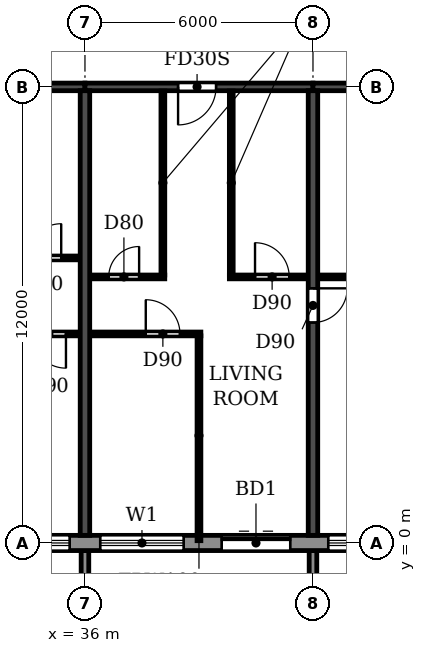
"""IFC4 building model, lengths in metres.
Left out: names, types, materials, properties, quantities, classifications, styles, units other than length and angle.
Written with IfcOpenShell. Run it as: python <this file> out.ifc"""

import sys

from ifc_helpers import new_model, si_unit, direction, frame, frame_2d, origin, place, context, subcontext, project, spatial, polyline, rectangle, outline, extrude, source, transform, mapped, element, fill, save


model = new_model("IFC4")
c1 = context("Model", 3, precision=1e-05, world=origin(), true_north=direction((0.0, 1.0)))
c2 = subcontext(c1, "Body", "Model", "MODEL_VIEW")
j1 = project(units=[si_unit("LENGTHUNIT", "METRE"), si_unit("PLANEANGLEUNIT", "RADIAN")], contexts=[c1])
p1 = place(None, origin())
s1 = spatial("IfcSite", under=j1, at=p1, CompositionType="ELEMENT")
p2 = place(p1, origin())
s2 = spatial("IfcBuilding", under=s1, at=p2, CompositionType="ELEMENT")
p3 = place(p2, frame((0.0, 0.0, 221.4)))
s3 = spatial("IfcBuildingStorey", under=s2, at=p3, CompositionType="ELEMENT", Elevation=221.4)
p4 = place(p3, frame((36.0, 0.2, 0.0), z_axis=(0.0, 0.0, 1.0), x_axis=(0.0, 1.0, 0.0)))
e1 = element("IfcWall", 1, at=p4, inside=s3, PredefinedType="SHEAR", context=c2, shape_type="SweptSolid", body=[
    extrude(rectangle(XDim=11.7, YDim=0.25, at=frame_2d((5.85, 0.0))), origin(), (0.0, 0.0, 1.0), 3.08),
])
p5 = place(p3, frame((42.0, 0.2, 0.0), z_axis=(0.0, 0.0, 1.0), x_axis=(0.0, 1.0, 0.0)))
e2 = element("IfcWall", 2, at=p5, inside=s3, PredefinedType="SHEAR", context=c2, shape_type="SweptSolid", body=[
    extrude(rectangle(XDim=11.7, YDim=0.25, at=frame_2d((5.85, 0.0))), origin(), (0.0, 0.0, 1.0), 3.08),
])
p6 = place(p5, frame((5.6, 0.0, 0.0)))
e3 = element("IfcOpeningElement", 3, at=p6, cuts=e2, PredefinedType="OPENING", context=c2, shape_type="SweptSolid", body=[
    extrude(rectangle(XDim=0.9, YDim=2.1, at=frame_2d((0.45, 1.05))), frame((0.0, 0.135, 0.0), z_axis=(0.0, -1.0, 0.0), x_axis=(1.0, 0.0, 0.0)), (0.0, 0.0, 1.0), 0.27),
])
p7 = place(p3, frame((30.0, 12.0, 0.0), z_axis=(0.0, 0.0, 1.0), x_axis=(1.0, 0.0, 0.0)))
e4 = element("IfcWall", 4, at=p7, inside=s3, PredefinedType="SHEAR", context=c2, shape_type="SweptSolid", body=[
    extrude(rectangle(XDim=6.0, YDim=0.2, at=frame_2d((3.0, 0.0))), origin(), (0.0, 0.0, 1.0), 2.48),
])
p8 = place(p7, frame((2.45, 0.0, 0.0)))
e5 = element("IfcOpeningElement", 5, at=p8, cuts=e4, PredefinedType="OPENING", context=c2, shape_type="SweptSolid", body=[
    extrude(rectangle(XDim=1.0, YDim=2.1, at=frame_2d((0.5, 1.05))), frame((0.0, 0.11, 0.0), z_axis=(0.0, -1.0, 0.0), x_axis=(1.0, 0.0, 0.0)), (0.0, 0.0, 1.0), 0.22),
])
p9 = place(p3, frame((36.0, 12.0, 0.0), z_axis=(0.0, 0.0, 1.0), x_axis=(1.0, 0.0, 0.0)))
e6 = element("IfcWall", 6, at=p9, inside=s3, PredefinedType="SHEAR", context=c2, shape_type="SweptSolid", body=[
    extrude(rectangle(XDim=6.0, YDim=0.2, at=frame_2d((3.0, 0.0))), origin(), (0.0, 0.0, 1.0), 2.48),
])
p10 = place(p9, frame((2.45, 0.0, 0.0)))
e7 = element("IfcOpeningElement", 7, at=p10, cuts=e6, PredefinedType="OPENING", context=c2, shape_type="SweptSolid", body=[
    extrude(rectangle(XDim=1.0, YDim=2.1, at=frame_2d((0.5, 1.05))), frame((0.0, 0.11, 0.0), z_axis=(0.0, -1.0, 0.0), x_axis=(1.0, 0.0, 0.0)), (0.0, 0.0, 1.0), 0.22),
])
p11 = place(p3, frame((42.0, 12.0, 0.0), z_axis=(0.0, 0.0, 1.0), x_axis=(1.0, 0.0, 0.0)))
e8 = element("IfcWall", 8, at=p11, inside=s3, PredefinedType="SHEAR", context=c2, shape_type="SweptSolid", body=[
    extrude(rectangle(XDim=6.0, YDim=0.2, at=frame_2d((3.0, 0.0))), origin(), (0.0, 0.0, 1.0), 2.48),
])
p12 = place(p3, frame((22.683, 0.0, 0.0), z_axis=(0.0, 0.0, 1.0), x_axis=(1.0, 0.0, 0.0)))
e9 = element("IfcWall", 9, at=p12, inside=s3, PredefinedType="STANDARD", context=c2, shape_type="SweptSolid", body=[
    extrude(rectangle(XDim=56.634, YDim=0.4, at=frame_2d((28.317, 0.0))), origin(), (0.0, 0.0, 1.0), 3.08),
])
p13 = place(p12, frame((1.717, 0.0, 0.9)))
e10 = element("IfcOpeningElement", 10, at=p13, cuts=e9, PredefinedType="OPENING", context=c2, shape_type="SweptSolid", body=[
    extrude(rectangle(XDim=2.2, YDim=1.5, at=frame_2d((1.1, 0.75))), frame((0.0, 0.21, 0.0), z_axis=(0.0, -1.0, 0.0), x_axis=(1.0, 0.0, 0.0)), (0.0, 0.0, 1.0), 0.42),
])
p14 = place(p12, frame((4.917, 0.0, 0.0)))
e11 = element("IfcOpeningElement", 11, at=p14, cuts=e9, PredefinedType="OPENING", context=c2, shape_type="SweptSolid", body=[
    extrude(rectangle(XDim=1.8, YDim=2.4, at=frame_2d((0.9, 1.2))), frame((0.0, 0.21, 0.0), z_axis=(0.0, -1.0, 0.0), x_axis=(1.0, 0.0, 0.0)), (0.0, 0.0, 1.0), 0.42),
])
p15 = place(p12, frame((7.717, 0.0, 0.9)))
e12 = element("IfcOpeningElement", 12, at=p15, cuts=e9, PredefinedType="OPENING", context=c2, shape_type="SweptSolid", body=[
    extrude(rectangle(XDim=2.2, YDim=1.5, at=frame_2d((1.1, 0.75))), frame((0.0, 0.21, 0.0), z_axis=(0.0, -1.0, 0.0), x_axis=(1.0, 0.0, 0.0)), (0.0, 0.0, 1.0), 0.42),
])
p16 = place(p12, frame((10.717, 0.0, 0.9)))
e13 = element("IfcOpeningElement", 13, at=p16, cuts=e9, PredefinedType="OPENING", context=c2, shape_type="SweptSolid", body=[
    extrude(rectangle(XDim=2.2, YDim=1.5, at=frame_2d((1.1, 0.75))), frame((0.0, 0.21, 0.0), z_axis=(0.0, -1.0, 0.0), x_axis=(1.0, 0.0, 0.0)), (0.0, 0.0, 1.0), 0.42),
])
p17 = place(p12, frame((13.717, 0.0, 0.9)))
e14 = element("IfcOpeningElement", 14, at=p17, cuts=e9, PredefinedType="OPENING", context=c2, shape_type="SweptSolid", body=[
    extrude(rectangle(XDim=2.2, YDim=1.5, at=frame_2d((1.1, 0.75))), frame((0.0, 0.21, 0.0), z_axis=(0.0, -1.0, 0.0), x_axis=(1.0, 0.0, 0.0)), (0.0, 0.0, 1.0), 0.42),
])
p18 = place(p12, frame((16.917, 0.0, 0.0)))
e15 = element("IfcOpeningElement", 15, at=p18, cuts=e9, PredefinedType="OPENING", context=c2, shape_type="SweptSolid", body=[
    extrude(rectangle(XDim=1.8, YDim=2.4, at=frame_2d((0.9, 1.2))), frame((0.0, 0.21, 0.0), z_axis=(0.0, -1.0, 0.0), x_axis=(1.0, 0.0, 0.0)), (0.0, 0.0, 1.0), 0.42),
])
p19 = place(p12, frame((19.717, 0.0, 0.9)))
e16 = element("IfcOpeningElement", 16, at=p19, cuts=e9, PredefinedType="OPENING", context=c2, shape_type="SweptSolid", body=[
    extrude(rectangle(XDim=2.2, YDim=1.5, at=frame_2d((1.1, 0.75))), frame((0.0, 0.21, 0.0), z_axis=(0.0, -1.0, 0.0), x_axis=(1.0, 0.0, 0.0)), (0.0, 0.0, 1.0), 0.42),
])
p20 = place(p12, frame((22.717, 0.0, 0.9)))
e17 = element("IfcOpeningElement", 17, at=p20, cuts=e9, PredefinedType="OPENING", context=c2, shape_type="SweptSolid", body=[
    extrude(rectangle(XDim=2.2, YDim=1.5, at=frame_2d((1.1, 0.75))), frame((0.0, 0.21, 0.0), z_axis=(0.0, -1.0, 0.0), x_axis=(1.0, 0.0, 0.0)), (0.0, 0.0, 1.0), 0.42),
])
p21 = place(p12, frame((25.917, 0.0, 0.0)))
e18 = element("IfcOpeningElement", 18, at=p21, cuts=e9, PredefinedType="OPENING", context=c2, shape_type="SweptSolid", body=[
    extrude(rectangle(XDim=1.8, YDim=2.4, at=frame_2d((0.9, 1.2))), frame((0.0, 0.21, 0.0), z_axis=(0.0, -1.0, 0.0), x_axis=(1.0, 0.0, 0.0)), (0.0, 0.0, 1.0), 0.42),
])
p22 = place(p12, frame((28.717, 0.0, 0.9)))
e19 = element("IfcOpeningElement", 19, at=p22, cuts=e9, PredefinedType="OPENING", context=c2, shape_type="SweptSolid", body=[
    extrude(rectangle(XDim=2.2, YDim=1.5, at=frame_2d((1.1, 0.75))), frame((0.0, 0.21, 0.0), z_axis=(0.0, -1.0, 0.0), x_axis=(1.0, 0.0, 0.0)), (0.0, 0.0, 1.0), 0.42),
])
p23 = place(p12, frame((31.717, 0.0, 0.9)))
e20 = element("IfcOpeningElement", 20, at=p23, cuts=e9, PredefinedType="OPENING", context=c2, shape_type="SweptSolid", body=[
    extrude(rectangle(XDim=2.2, YDim=1.5, at=frame_2d((1.1, 0.75))), frame((0.0, 0.21, 0.0), z_axis=(0.0, -1.0, 0.0), x_axis=(1.0, 0.0, 0.0)), (0.0, 0.0, 1.0), 0.42),
])
p24 = place(p12, frame((34.717, 0.0, 0.9)))
e21 = element("IfcOpeningElement", 21, at=p24, cuts=e9, PredefinedType="OPENING", context=c2, shape_type="SweptSolid", body=[
    extrude(rectangle(XDim=2.2, YDim=1.5, at=frame_2d((1.1, 0.75))), frame((0.0, 0.21, 0.0), z_axis=(0.0, -1.0, 0.0), x_axis=(1.0, 0.0, 0.0)), (0.0, 0.0, 1.0), 0.42),
])
p25 = place(p12, frame((37.917, 0.0, 0.0)))
e22 = element("IfcOpeningElement", 22, at=p25, cuts=e9, PredefinedType="OPENING", context=c2, shape_type="SweptSolid", body=[
    extrude(rectangle(XDim=1.8, YDim=2.4, at=frame_2d((0.9, 1.2))), frame((0.0, 0.21, 0.0), z_axis=(0.0, -1.0, 0.0), x_axis=(1.0, 0.0, 0.0)), (0.0, 0.0, 1.0), 0.42),
])
p26 = place(p12, frame((40.717, 0.0, 0.9)))
e23 = element("IfcOpeningElement", 23, at=p26, cuts=e9, PredefinedType="OPENING", context=c2, shape_type="SweptSolid", body=[
    extrude(rectangle(XDim=2.2, YDim=1.5, at=frame_2d((1.1, 0.75))), frame((0.0, 0.21, 0.0), z_axis=(0.0, -1.0, 0.0), x_axis=(1.0, 0.0, 0.0)), (0.0, 0.0, 1.0), 0.42),
])
p27 = place(p12, frame((43.717, 0.0, 0.9)))
e24 = element("IfcOpeningElement", 24, at=p27, cuts=e9, PredefinedType="OPENING", context=c2, shape_type="SweptSolid", body=[
    extrude(rectangle(XDim=2.2, YDim=1.5, at=frame_2d((1.1, 0.75))), frame((0.0, 0.21, 0.0), z_axis=(0.0, -1.0, 0.0), x_axis=(1.0, 0.0, 0.0)), (0.0, 0.0, 1.0), 0.42),
])
p28 = place(p12, frame((46.717, 0.0, 0.9)))
e25 = element("IfcOpeningElement", 25, at=p28, cuts=e9, PredefinedType="OPENING", context=c2, shape_type="SweptSolid", body=[
    extrude(rectangle(XDim=2.2, YDim=1.5, at=frame_2d((1.1, 0.75))), frame((0.0, 0.21, 0.0), z_axis=(0.0, -1.0, 0.0), x_axis=(1.0, 0.0, 0.0)), (0.0, 0.0, 1.0), 0.42),
])
p29 = place(p12, frame((49.917, 0.0, 0.0)))
e26 = element("IfcOpeningElement", 26, at=p29, cuts=e9, PredefinedType="OPENING", context=c2, shape_type="SweptSolid", body=[
    extrude(rectangle(XDim=1.8, YDim=2.4, at=frame_2d((0.9, 1.2))), frame((0.0, 0.21, 0.0), z_axis=(0.0, -1.0, 0.0), x_axis=(1.0, 0.0, 0.0)), (0.0, 0.0, 1.0), 0.42),
])
p30 = place(p12, frame((52.717, 0.0, 0.9)))
e27 = element("IfcOpeningElement", 27, at=p30, cuts=e9, PredefinedType="OPENING", context=c2, shape_type="SweptSolid", body=[
    extrude(rectangle(XDim=2.2, YDim=1.5, at=frame_2d((1.1, 0.75))), frame((0.0, 0.21, 0.0), z_axis=(0.0, -1.0, 0.0), x_axis=(1.0, 0.0, 0.0)), (0.0, 0.0, 1.0), 0.42),
])
m1 = source(origin(), c2, "Body", "SweptSolid", [
    extrude(outline(polyline([(0.0, 0.0), (0.2, 0.0), (0.2, 1.65), (0.0, 1.65), (0.0, 0.0)])), origin(), (0.0, 0.0, 1.0), 3.1),
])
for number, where in (
    (28, (35.9, -1.85, 0.0)),
    (29, (41.9, -1.85, 0.0)),
):
    element("IfcWall", number, at=place(p3, frame(where)), inside=s3, PredefinedType="STANDARD", context=c2, shape_type="MappedRepresentation", body=[
        mapped(m1, transform((0.0, 0.0, 0.0))),
    ])
p31 = place(p3, frame((32.95, 5.5, 0.0), z_axis=(0.0, 0.0, 1.0), x_axis=(1.0, 0.0, 0.0)))
e30 = element("IfcWall", 30, at=p31, inside=s3, PredefinedType="PARTITIONING", context=c2, shape_type="SweptSolid", body=[
    extrude(rectangle(XDim=2.915, YDim=0.1, at=frame_2d((1.458, 0.0))), origin(), (0.0, 0.0, 1.0), 3.08),
])
p32 = place(p31, frame((1.65, 0.0, 0.0)))
e31 = element("IfcOpeningElement", 31, at=p32, cuts=e30, PredefinedType="OPENING", context=c2, shape_type="SweptSolid", body=[
    extrude(rectangle(XDim=0.9, YDim=2.1, at=frame_2d((0.45, 1.05))), frame((0.0, 0.06, 0.0), z_axis=(0.0, -1.0, 0.0), x_axis=(1.0, 0.0, 0.0)), (0.0, 0.0, 1.0), 0.12),
])
p33 = place(p3, frame((36.135, 5.5, 0.0), z_axis=(0.0, 0.0, 1.0), x_axis=(1.0, 0.0, 0.0)))
e32 = element("IfcWall", 32, at=p33, inside=s3, PredefinedType="PARTITIONING", context=c2, shape_type="SweptSolid", body=[
    extrude(rectangle(XDim=2.915, YDim=0.1, at=frame_2d((1.458, 0.0))), origin(), (0.0, 0.0, 1.0), 3.08),
])
p34 = place(p33, frame((1.465, 0.0, 0.0)))
e33 = element("IfcOpeningElement", 33, at=p34, cuts=e32, PredefinedType="OPENING", context=c2, shape_type="SweptSolid", body=[
    extrude(rectangle(XDim=0.9, YDim=2.1, at=frame_2d((0.45, 1.05))), frame((0.0, 0.06, 0.0), z_axis=(0.0, -1.0, 0.0), x_axis=(1.0, 0.0, 0.0)), (0.0, 0.0, 1.0), 0.12),
])
p35 = place(p3, frame((36.135, 7.0, 0.0), z_axis=(0.0, 0.0, 1.0), x_axis=(1.0, 0.0, 0.0)))
e34 = element("IfcWall", 34, at=p35, inside=s3, PredefinedType="PARTITIONING", context=c2, shape_type="SweptSolid", body=[
    extrude(rectangle(XDim=1.965, YDim=0.1, at=frame_2d((0.982, 0.0))), origin(), (0.0, 0.0, 1.0), 3.08),
])
p36 = place(p35, frame((0.49, 0.0, 0.0)))
e35 = element("IfcOpeningElement", 35, at=p36, cuts=e34, PredefinedType="OPENING", context=c2, shape_type="SweptSolid", body=[
    extrude(rectangle(XDim=0.8, YDim=2.1, at=frame_2d((0.4, 1.05))), frame((0.0, 0.06, 0.0), z_axis=(0.0, -1.0, 0.0), x_axis=(1.0, 0.0, 0.0)), (0.0, 0.0, 1.0), 0.12),
])
p37 = place(p3, frame((39.8, 7.0, 0.0), z_axis=(0.0, 0.0, 1.0), x_axis=(1.0, 0.0, 0.0)))
e36 = element("IfcWall", 36, at=p37, inside=s3, PredefinedType="PARTITIONING", context=c2, shape_type="SweptSolid", body=[
    extrude(rectangle(XDim=2.065, YDim=0.1, at=frame_2d((1.032, 0.0))), origin(), (0.0, 0.0, 1.0), 3.08),
])
p38 = place(p37, frame((0.675, 0.0, 0.0)))
e37 = element("IfcOpeningElement", 37, at=p38, cuts=e36, PredefinedType="OPENING", context=c2, shape_type="SweptSolid", body=[
    extrude(rectangle(XDim=0.9, YDim=2.1, at=frame_2d((0.45, 1.05))), frame((0.0, 0.06, 0.0), z_axis=(0.0, -1.0, 0.0), x_axis=(1.0, 0.0, 0.0)), (0.0, 0.0, 1.0), 0.12),
])
p39 = place(p3, frame((42.135, 7.0, 0.0), z_axis=(0.0, 0.0, 1.0), x_axis=(1.0, 0.0, 0.0)))
e38 = element("IfcWall", 38, at=p39, inside=s3, PredefinedType="PARTITIONING", context=c2, shape_type="SweptSolid", body=[
    extrude(rectangle(XDim=2.765, YDim=0.1, at=frame_2d((1.382, 0.0))), origin(), (0.0, 0.0, 1.0), 3.08),
])
p40 = place(p39, frame((0.965, 0.0, 0.0)))
e39 = element("IfcOpeningElement", 39, at=p40, cuts=e38, PredefinedType="OPENING", context=c2, shape_type="SweptSolid", body=[
    extrude(rectangle(XDim=0.8, YDim=2.1, at=frame_2d((0.4, 1.05))), frame((0.0, 0.06, 0.0), z_axis=(0.0, -1.0, 0.0), x_axis=(1.0, 0.0, 0.0)), (0.0, 0.0, 1.0), 0.12),
])
p41 = place(p3, frame((33.8, 7.5, 0.0), z_axis=(0.0, 0.0, 1.0), x_axis=(1.0, 0.0, 0.0)))
e40 = element("IfcWall", 40, at=p41, inside=s3, PredefinedType="PARTITIONING", context=c2, shape_type="SweptSolid", body=[
    extrude(rectangle(XDim=2.065, YDim=0.1, at=frame_2d((1.032, 0.0))), origin(), (0.0, 0.0, 1.0), 3.08),
])
p42 = place(p41, frame((0.675, 0.0, 0.0)))
e41 = element("IfcOpeningElement", 41, at=p42, cuts=e40, PredefinedType="OPENING", context=c2, shape_type="SweptSolid", body=[
    extrude(rectangle(XDim=0.9, YDim=2.1, at=frame_2d((0.45, 1.05))), frame((0.0, 0.06, 0.0), z_axis=(0.0, -1.0, 0.0), x_axis=(1.0, 0.0, 0.0)), (0.0, 0.0, 1.0), 0.12),
])
p43 = place(p3, frame((38.05, 7.05, 0.0), z_axis=(0.0, 0.0, 1.0), x_axis=(0.0, 1.0, 0.0)))
e42 = element("IfcWall", 42, at=p43, inside=s3, PredefinedType="PARTITIONING", context=c2, shape_type="SweptSolid", body=[
    extrude(rectangle(XDim=4.84, YDim=0.1, at=frame_2d((2.42, 0.0))), origin(), (0.0, 0.0, 1.0), 3.08),
])
p44 = place(p3, frame((39.0, 0.06, 0.0), z_axis=(0.0, 0.0, 1.0), x_axis=(0.0, 1.0, 0.0)))
e43 = element("IfcWall", 43, at=p44, inside=s3, PredefinedType="PARTITIONING", context=c2, shape_type="SweptSolid", body=[
    extrude(rectangle(XDim=5.39, YDim=0.1, at=frame_2d((2.695, 0.0))), origin(), (0.0, 0.0, 1.0), 3.08),
])
p45 = place(p3, frame((39.85, 7.05, 0.0), z_axis=(0.0, 0.0, 1.0), x_axis=(0.0, 1.0, 0.0)))
e44 = element("IfcWall", 44, at=p45, inside=s3, PredefinedType="PARTITIONING", context=c2, shape_type="SweptSolid", body=[
    extrude(rectangle(XDim=4.84, YDim=0.1, at=frame_2d((2.42, 0.0))), origin(), (0.0, 0.0, 1.0), 3.08),
])
p46 = place(p16, origin())
e45 = element("IfcWindow", 45, at=p46, inside=s3, PartitioningType="DOUBLE_PANEL_HORIZONTAL", PredefinedType="WINDOW", context=c2, shape_type="SweptSolid", body=[
    extrude(rectangle(XDim=2.2, YDim=1.5, at=frame_2d((1.1, 0.75))), frame((0.0, 0.03, 0.0), z_axis=(0.0, -1.0, 0.0), x_axis=(1.0, 0.0, 0.0)), (0.0, 0.0, 1.0), 0.06),
])
fill(e13, e45)
p47 = place(p17, origin())
e46 = element("IfcWindow", 46, at=p47, inside=s3, PartitioningType="DOUBLE_PANEL_HORIZONTAL", PredefinedType="WINDOW", context=c2, shape_type="SweptSolid", body=[
    extrude(rectangle(XDim=2.2, YDim=1.5, at=frame_2d((1.1, 0.75))), frame((0.0, 0.03, 0.0), z_axis=(0.0, -1.0, 0.0), x_axis=(1.0, 0.0, 0.0)), (0.0, 0.0, 1.0), 0.06),
])
fill(e14, e46)
p48 = place(p18, origin())
e47 = element("IfcDoor", 47, at=p48, inside=s3, OperationType="DOUBLE_DOOR_SLIDING", PredefinedType="DOOR", context=c2, shape_type="SweptSolid", body=[
    extrude(rectangle(XDim=1.8, YDim=2.4, at=frame_2d((0.9, 1.2))), frame((0.0, 0.025, 0.0), z_axis=(0.0, -1.0, 0.0), x_axis=(1.0, 0.0, 0.0)), (0.0, 0.0, 1.0), 0.05),
])
fill(e15, e47)
p49 = place(p19, origin())
e48 = element("IfcWindow", 48, at=p49, inside=s3, PartitioningType="DOUBLE_PANEL_HORIZONTAL", PredefinedType="WINDOW", context=c2, shape_type="SweptSolid", body=[
    extrude(rectangle(XDim=2.2, YDim=1.5, at=frame_2d((1.1, 0.75))), frame((0.0, 0.03, 0.0), z_axis=(0.0, -1.0, 0.0), x_axis=(1.0, 0.0, 0.0)), (0.0, 0.0, 1.0), 0.06),
])
fill(e16, e48)
p50 = place(p42, origin())
e49 = element("IfcDoor", 49, at=p50, inside=s3, OperationType="SINGLE_SWING_RIGHT", PredefinedType="DOOR", context=c2, shape_type="SweptSolid", body=[
    extrude(rectangle(XDim=0.9, YDim=2.1, at=frame_2d((0.45, 1.05))), frame((0.0, 0.025, 0.0), z_axis=(0.0, -1.0, 0.0), x_axis=(1.0, 0.0, 0.0)), (0.0, 0.0, 1.0), 0.05),
])
fill(e41, e49)
p51 = place(p32, frame((0.9, 0.0, 0.0), z_axis=(0.0, 0.0, 1.0), x_axis=(-1.0, 0.0, 0.0)))
e50 = element("IfcDoor", 50, at=p51, inside=s3, OperationType="SINGLE_SWING_LEFT", PredefinedType="DOOR", context=c2, shape_type="SweptSolid", body=[
    extrude(rectangle(XDim=0.9, YDim=2.1, at=frame_2d((0.45, 1.05))), frame((0.0, 0.025, 0.0), z_axis=(0.0, -1.0, 0.0), x_axis=(1.0, 0.0, 0.0)), (0.0, 0.0, 1.0), 0.05),
])
fill(e31, e50)
p52 = place(p36, origin())
e51 = element("IfcDoor", 51, at=p52, inside=s3, OperationType="SINGLE_SWING_RIGHT", PredefinedType="DOOR", context=c2, shape_type="SweptSolid", body=[
    extrude(rectangle(XDim=0.8, YDim=2.1, at=frame_2d((0.4, 1.05))), frame((0.0, 0.025, 0.0), z_axis=(0.0, -1.0, 0.0), x_axis=(1.0, 0.0, 0.0)), (0.0, 0.0, 1.0), 0.05),
])
fill(e35, e51)
p53 = place(p34, origin())
e52 = element("IfcDoor", 52, at=p53, inside=s3, OperationType="SINGLE_SWING_LEFT", PredefinedType="DOOR", context=c2, shape_type="SweptSolid", body=[
    extrude(rectangle(XDim=0.9, YDim=2.1, at=frame_2d((0.45, 1.05))), frame((0.0, 0.025, 0.0), z_axis=(0.0, -1.0, 0.0), x_axis=(1.0, 0.0, 0.0)), (0.0, 0.0, 1.0), 0.05),
])
fill(e33, e52)
p54 = place(p10, frame((1.0, 0.0, 0.0), z_axis=(0.0, 0.0, 1.0), x_axis=(-1.0, 0.0, 0.0)))
e53 = element("IfcDoor", 53, at=p54, inside=s3, OperationType="SINGLE_SWING_RIGHT", PredefinedType="DOOR", context=c2, shape_type="SweptSolid", body=[
    extrude(rectangle(XDim=1.0, YDim=2.1, at=frame_2d((0.5, 1.05))), frame((0.0, 0.025, 0.0), z_axis=(0.0, -1.0, 0.0), x_axis=(1.0, 0.0, 0.0)), (0.0, 0.0, 1.0), 0.05),
])
fill(e7, e53)
p55 = place(p38, origin())
e54 = element("IfcDoor", 54, at=p55, inside=s3, OperationType="SINGLE_SWING_LEFT", PredefinedType="DOOR", context=c2, shape_type="SweptSolid", body=[
    extrude(rectangle(XDim=0.9, YDim=2.1, at=frame_2d((0.45, 1.05))), frame((0.0, 0.025, 0.0), z_axis=(0.0, -1.0, 0.0), x_axis=(1.0, 0.0, 0.0)), (0.0, 0.0, 1.0), 0.05),
])
fill(e37, e54)
p56 = place(p6, frame((0.9, 0.0, 0.0), z_axis=(0.0, 0.0, 1.0), x_axis=(-1.0, 0.0, 0.0)))
e55 = element("IfcDoor", 55, at=p56, inside=s3, OperationType="SINGLE_SWING_LEFT", PredefinedType="DOOR", context=c2, shape_type="SweptSolid", body=[
    extrude(rectangle(XDim=0.9, YDim=2.1, at=frame_2d((0.45, 1.05))), frame((0.0, 0.025, 0.0), z_axis=(0.0, -1.0, 0.0), x_axis=(1.0, 0.0, 0.0)), (0.0, 0.0, 1.0), 0.05),
])
fill(e3, e55)
save(model, sys.argv[1])
